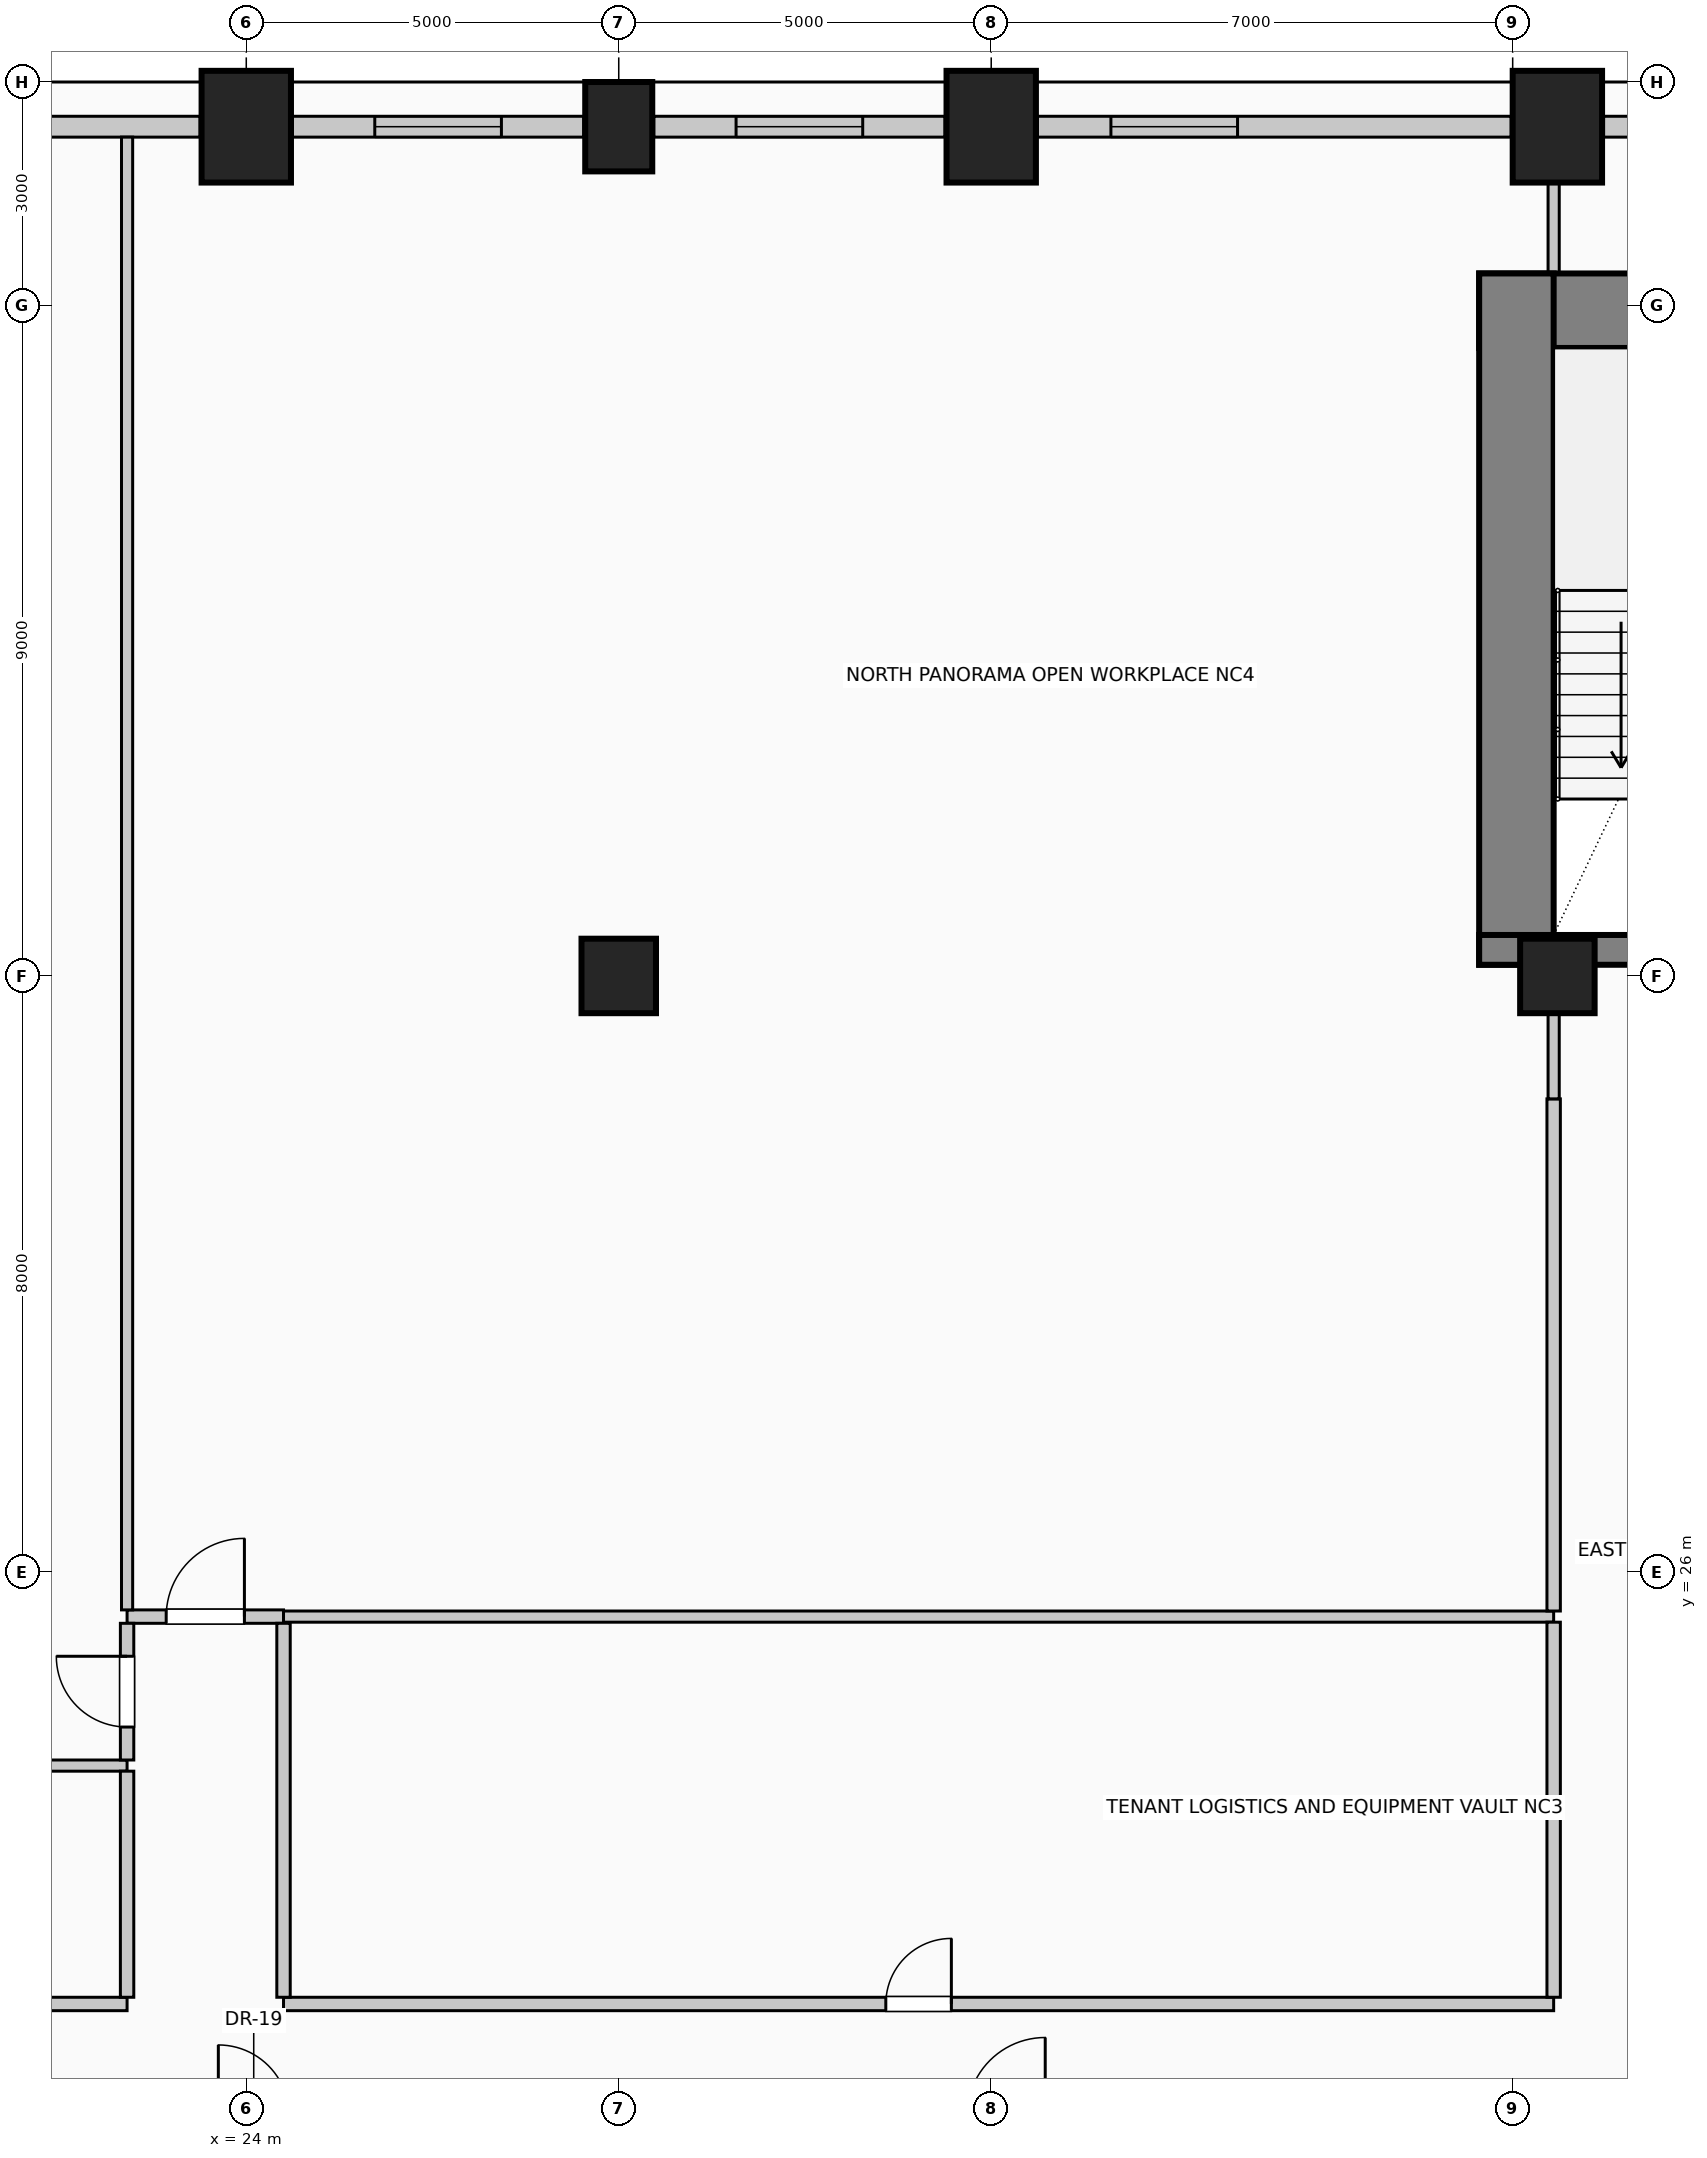
"""IFC4 building model, lengths in metres.
Left out: names, types, materials, properties, quantities, classifications, styles, units other than length and angle.
Written with IfcOpenShell. Run it as: python <this file> out.ifc"""

import sys

from ifc_helpers import new_model, si_unit, direction, frame, frame_2d, origin, origin_2d, place, context, subcontext, project, spatial, rectangle, circle, extrude, element, fill, save


model = new_model("IFC4")
c1 = context("Model", 3, precision=1e-05, world=origin(), true_north=direction((0.0, 1.0)))
c2 = subcontext(c1, "Body", "Model", "MODEL_VIEW")
j1 = project(units=[si_unit("LENGTHUNIT", "METRE"), si_unit("PLANEANGLEUNIT", "RADIAN")], contexts=[c1])
p1 = place(None, origin())
s1 = spatial("IfcSite", under=j1, at=p1, CompositionType="ELEMENT")
p2 = place(p1, origin())
s2 = spatial("IfcBuilding", under=s1, at=p2, CompositionType="ELEMENT")
p3 = place(p2, frame((0.0, 0.0, 78.6)))
s3 = spatial("IfcBuildingStorey", under=s2, at=p3, CompositionType="ELEMENT", Elevation=78.6)
p4 = place(p3, frame((40.55, 42.93, 0.0), z_axis=(0.0, 0.0, 1.0), x_axis=(1.0, 0.0, 0.0)))
e1 = element("IfcWall", 1, at=p4, inside=s3, PredefinedType="SHEAR", context=c2, shape_type="SweptSolid", body=[
    extrude(rectangle(XDim=14.9, YDim=1.0, at=frame_2d((7.45, 0.0))), origin(), (0.0, 0.0, 1.0), 4.0),
])
p5 = place(p3, frame((41.05, 34.15, 0.0), z_axis=(0.0, 0.0, 1.0), x_axis=(0.0, 1.0, 0.0)))
e2 = element("IfcWall", 2, at=p5, inside=s3, PredefinedType="SHEAR", context=c2, shape_type="SweptSolid", body=[
    extrude(rectangle(XDim=9.28, YDim=1.0, at=frame_2d((4.64, 0.0))), origin(), (0.0, 0.0, 1.0), 4.0),
])
p6 = place(p3, frame((40.55, 34.35, 0.0), z_axis=(0.0, 0.0, 1.0), x_axis=(1.0, 0.0, 0.0)))
e3 = element("IfcWall", 3, at=p6, inside=s3, PredefinedType="SHEAR", context=c2, shape_type="SweptSolid", body=[
    extrude(rectangle(XDim=5.16, YDim=0.4, at=frame_2d((2.58, 0.0))), origin(), (0.0, 0.0, 1.0), 4.0),
])
p7 = place(p6, frame((2.4, 0.0, 0.0)))
e4 = element("IfcOpeningElement", 4, at=p7, cuts=e3, PredefinedType="OPENING", context=c2, shape_type="SweptSolid", body=[
    extrude(rectangle(XDim=1.15, YDim=2.2, at=frame_2d((0.575, 1.1))), frame((0.0, 0.21, 0.0), z_axis=(0.0, -1.0, 0.0), x_axis=(1.0, 0.0, 0.0)), (0.0, 0.0, 1.0), 0.42),
])
p8 = place(p3, frame((24.0, 45.4, 0.0), z_axis=(0.0, 0.0, 1.0), x_axis=(1.0, 0.0, 0.0)))
e5 = element("IfcColumn", 5, at=p8, inside=s3, PredefinedType="COLUMN", context=c2, shape_type="SweptSolid", body=[
    extrude(rectangle(XDim=1.2, YDim=1.5, at=origin_2d()), origin(), (0.0, 0.0, 1.0), 4.0),
])
p9 = place(p3, frame((29.0, 45.4, 0.0), z_axis=(0.0, 0.0, 1.0), x_axis=(1.0, 0.0, 0.0)))
e6 = element("IfcColumn", 6, at=p9, inside=s3, PredefinedType="COLUMN", context=c2, shape_type="SweptSolid", body=[
    extrude(rectangle(XDim=0.9, YDim=1.2, at=origin_2d()), origin(), (0.0, 0.0, 1.0), 4.0),
])
for number, where, z_axis, x_axis in (
    (7, (34.0, 45.4, 0.0), (0.0, 0.0, 1.0), (1.0, 0.0, 0.0)),
    (8, (41.6, 45.4, 0.0), (0.0, 0.0, 1.0), (1.0, 0.0, 0.0)),
):
    element("IfcColumn", number, at=place(p3, frame(where, z_axis=z_axis, x_axis=x_axis)), inside=s3, PredefinedType="COLUMN", context=c2, shape_type="SweptSolid", body=[
        extrude(rectangle(XDim=1.2, YDim=1.5, at=origin_2d()), origin(), (0.0, 0.0, 1.0), 4.0),
    ])
for number, where, z_axis, x_axis in (
    (9, (29.0, 34.0, 0.0), (0.0, 0.0, 1.0), (1.0, 0.0, 0.0)),
    (10, (41.6, 34.0, 0.0), (0.0, 0.0, 1.0), (1.0, 0.0, 0.0)),
):
    element("IfcColumn", number, at=place(p3, frame(where, z_axis=z_axis, x_axis=x_axis)), inside=s3, PredefinedType="COLUMN", context=c2, shape_type="SweptSolid", body=[
        extrude(circle(Radius=0.5, at=origin_2d()), origin(), (0.0, 0.0, 1.0), 4.0),
    ])
p10 = place(p3, frame((17.02, 45.4, 0.0), z_axis=(0.0, 0.0, 1.0), x_axis=(1.0, 0.0, 0.0)))
e11 = element("IfcWall", 11, at=p10, inside=s3, PredefinedType="SOLIDWALL", context=c2, shape_type="SweptSolid", body=[
    extrude(rectangle(XDim=6.36, YDim=0.28, at=frame_2d((3.18, 0.0))), origin(), (0.0, 0.0, 1.0), 2.81),
])
p11 = place(p3, frame((24.62, 45.4, 0.0), z_axis=(0.0, 0.0, 1.0), x_axis=(1.0, 0.0, 0.0)))
e12 = element("IfcWall", 12, at=p11, inside=s3, PredefinedType="SOLIDWALL", context=c2, shape_type="SweptSolid", body=[
    extrude(rectangle(XDim=3.91, YDim=0.28, at=frame_2d((1.955, 0.0))), origin(), (0.0, 0.0, 1.0), 2.81),
])
p12 = place(p11, frame((1.105, 0.0, 0.5)))
e13 = element("IfcOpeningElement", 13, at=p12, cuts=e12, PredefinedType="OPENING", context=c2, shape_type="SweptSolid", body=[
    extrude(rectangle(XDim=1.7, YDim=1.95, at=frame_2d((0.85, 0.975))), frame((0.0, 0.15, 0.0), z_axis=(0.0, -1.0, 0.0), x_axis=(1.0, 0.0, 0.0)), (0.0, 0.0, 1.0), 0.3),
])
p13 = place(p3, frame((29.47, 45.4, 0.0), z_axis=(0.0, 0.0, 1.0), x_axis=(1.0, 0.0, 0.0)))
e14 = element("IfcWall", 14, at=p13, inside=s3, PredefinedType="SOLIDWALL", context=c2, shape_type="SweptSolid", body=[
    extrude(rectangle(XDim=3.91, YDim=0.28, at=frame_2d((1.955, 0.0))), origin(), (0.0, 0.0, 1.0), 2.81),
])
p14 = place(p13, frame((1.105, 0.0, 0.5)))
e15 = element("IfcOpeningElement", 15, at=p14, cuts=e14, PredefinedType="OPENING", context=c2, shape_type="SweptSolid", body=[
    extrude(rectangle(XDim=1.7, YDim=1.95, at=frame_2d((0.85, 0.975))), frame((0.0, 0.15, 0.0), z_axis=(0.0, -1.0, 0.0), x_axis=(1.0, 0.0, 0.0)), (0.0, 0.0, 1.0), 0.3),
])
p15 = place(p3, frame((34.62, 45.4, 0.0), z_axis=(0.0, 0.0, 1.0), x_axis=(1.0, 0.0, 0.0)))
e16 = element("IfcWall", 16, at=p15, inside=s3, PredefinedType="SOLIDWALL", context=c2, shape_type="SweptSolid", body=[
    extrude(rectangle(XDim=6.36, YDim=0.28, at=frame_2d((3.18, 0.0))), origin(), (0.0, 0.0, 1.0), 2.81),
])
p16 = place(p15, frame((0.987, 0.0, 0.5)))
e17 = element("IfcOpeningElement", 17, at=p16, cuts=e16, PredefinedType="OPENING", context=c2, shape_type="SweptSolid", body=[
    extrude(rectangle(XDim=1.7, YDim=1.95, at=frame_2d((0.85, 0.975))), frame((0.0, 0.15, 0.0), z_axis=(0.0, -1.0, 0.0), x_axis=(1.0, 0.0, 0.0)), (0.0, 0.0, 1.0), 0.3),
])
p17 = place(p3, frame((42.22, 45.4, 0.0), z_axis=(0.0, 0.0, 1.0), x_axis=(1.0, 0.0, 0.0)))
e18 = element("IfcWall", 18, at=p17, inside=s3, PredefinedType="SOLIDWALL", context=c2, shape_type="SweptSolid", body=[
    extrude(rectangle(XDim=1.31, YDim=0.28, at=frame_2d((0.655, 0.0))), origin(), (0.0, 0.0, 1.0), 2.81),
])
p18 = place(p3, frame((16.65, 20.2, 0.0), z_axis=(0.0, 0.0, 1.0), x_axis=(1.0, 0.0, 0.0)))
e19 = element("IfcWall", 19, at=p18, inside=s3, PredefinedType="PARTITIONING", context=c2, shape_type="SweptSolid", body=[
    extrude(rectangle(XDim=5.75, YDim=0.18, at=frame_2d((2.875, 0.0))), origin(), (0.0, 0.0, 1.0), 3.66),
])
p19 = place(p18, frame((2.35, 0.0, 0.0)))
e20 = element("IfcOpeningElement", 20, at=p19, cuts=e19, PredefinedType="OPENING", context=c2, shape_type="SweptSolid", body=[
    extrude(rectangle(XDim=1.05, YDim=2.15, at=frame_2d((0.525, 1.075))), frame((0.0, 0.1, 0.0), z_axis=(0.0, -1.0, 0.0), x_axis=(1.0, 0.0, 0.0)), (0.0, 0.0, 1.0), 0.2),
])
p20 = place(p3, frame((24.5, 20.2, 0.0), z_axis=(0.0, 0.0, 1.0), x_axis=(1.0, 0.0, 0.0)))
e21 = element("IfcWall", 21, at=p20, inside=s3, PredefinedType="PARTITIONING", context=c2, shape_type="SweptSolid", body=[
    extrude(rectangle(XDim=17.05, YDim=0.18, at=frame_2d((8.525, 0.0))), origin(), (0.0, 0.0, 1.0), 3.66),
])
p21 = place(p20, frame((8.085, 0.0, 0.0)))
e22 = element("IfcOpeningElement", 22, at=p21, cuts=e21, PredefinedType="OPENING", context=c2, shape_type="SweptSolid", body=[
    extrude(rectangle(XDim=0.88, YDim=2.1, at=frame_2d((0.44, 1.05))), frame((0.0, 0.1, 0.0), z_axis=(0.0, -1.0, 0.0), x_axis=(1.0, 0.0, 0.0)), (0.0, 0.0, 1.0), 0.2),
])
p22 = place(p3, frame((16.65, 23.4, 0.0), z_axis=(0.0, 0.0, 1.0), x_axis=(1.0, 0.0, 0.0)))
e23 = element("IfcWall", 23, at=p22, inside=s3, PredefinedType="PARTITIONING", context=c2, shape_type="SweptSolid", body=[
    extrude(rectangle(XDim=5.75, YDim=0.15, at=frame_2d((2.875, 0.0))), origin(), (0.0, 0.0, 1.0), 3.66),
])
p23 = place(p3, frame((22.4, 25.4, 0.0), z_axis=(0.0, 0.0, 1.0), x_axis=(1.0, 0.0, 0.0)))
e24 = element("IfcWall", 24, at=p23, inside=s3, PredefinedType="PARTITIONING", context=c2, shape_type="SweptSolid", body=[
    extrude(rectangle(XDim=2.1, YDim=0.18, at=frame_2d((1.05, 0.0))), origin(), (0.0, 0.0, 1.0), 3.055),
])
p24 = place(p23, frame((0.525, 0.0, 0.0)))
e25 = element("IfcOpeningElement", 25, at=p24, cuts=e24, PredefinedType="OPENING", context=c2, shape_type="SweptSolid", body=[
    extrude(rectangle(XDim=1.05, YDim=2.15, at=frame_2d((0.525, 1.075))), frame((0.0, 0.1, 0.0), z_axis=(0.0, -1.0, 0.0), x_axis=(1.0, 0.0, 0.0)), (0.0, 0.0, 1.0), 0.2),
])
p25 = place(p3, frame((24.5, 25.4, 0.0), z_axis=(0.0, 0.0, 1.0), x_axis=(1.0, 0.0, 0.0)))
e26 = element("IfcWall", 26, at=p25, inside=s3, PredefinedType="PARTITIONING", context=c2, shape_type="SweptSolid", body=[
    extrude(rectangle(XDim=17.05, YDim=0.15, at=frame_2d((8.525, 0.0))), origin(), (0.0, 0.0, 1.0), 3.055),
])
p26 = place(p3, frame((22.4, 20.29, 0.0), z_axis=(0.0, 0.0, 1.0), x_axis=(0.0, 1.0, 0.0)))
e27 = element("IfcWall", 27, at=p26, inside=s3, PredefinedType="PARTITIONING", context=c2, shape_type="SweptSolid", body=[
    extrude(rectangle(XDim=3.035, YDim=0.18, at=frame_2d((1.518, 0.0))), origin(), (0.0, 0.0, 1.0), 3.66),
])
p27 = place(p3, frame((22.4, 23.475, 0.0), z_axis=(0.0, 0.0, 1.0), x_axis=(0.0, 1.0, 0.0)))
e28 = element("IfcWall", 28, at=p27, inside=s3, PredefinedType="PARTITIONING", context=c2, shape_type="SweptSolid", body=[
    extrude(rectangle(XDim=1.835, YDim=0.18, at=frame_2d((0.917, 0.0))), origin(), (0.0, 0.0, 1.0), 3.66),
])
p28 = place(p27, frame((0.442, 0.0, 0.0)))
e29 = element("IfcOpeningElement", 29, at=p28, cuts=e28, PredefinedType="OPENING", context=c2, shape_type="SweptSolid", body=[
    extrude(rectangle(XDim=0.95, YDim=2.15, at=frame_2d((0.475, 1.075))), frame((0.0, 0.1, 0.0), z_axis=(0.0, -1.0, 0.0), x_axis=(1.0, 0.0, 0.0)), (0.0, 0.0, 1.0), 0.2),
])
p29 = place(p3, frame((22.4, 25.49, 0.0), z_axis=(0.0, 0.0, 1.0), x_axis=(0.0, 1.0, 0.0)))
e30 = element("IfcWall", 30, at=p29, inside=s3, PredefinedType="PARTITIONING", context=c2, shape_type="SweptSolid", body=[
    extrude(rectangle(XDim=19.77, YDim=0.15, at=frame_2d((9.885, 0.0))), origin(), (0.0, 0.0, 1.0), 3.66),
])
p30 = place(p3, frame((24.5, 20.29, 0.0), z_axis=(0.0, 0.0, 1.0), x_axis=(0.0, 1.0, 0.0)))
e31 = element("IfcWall", 31, at=p30, inside=s3, PredefinedType="PARTITIONING", context=c2, shape_type="SweptSolid", body=[
    extrude(rectangle(XDim=5.02, YDim=0.18, at=frame_2d((2.51, 0.0))), origin(), (0.0, 0.0, 1.0), 3.66),
])
p31 = place(p3, frame((41.55, 20.29, 0.0), z_axis=(0.0, 0.0, 1.0), x_axis=(0.0, 1.0, 0.0)))
e32 = element("IfcWall", 32, at=p31, inside=s3, PredefinedType="PARTITIONING", context=c2, shape_type="SweptSolid", body=[
    extrude(rectangle(XDim=5.035, YDim=0.18, at=frame_2d((2.518, 0.0))), origin(), (0.0, 0.0, 1.0), 2.955),
])
p32 = place(p3, frame((41.55, 25.475, 0.0), z_axis=(0.0, 0.0, 1.0), x_axis=(0.0, 1.0, 0.0)))
e33 = element("IfcWall", 33, at=p32, inside=s3, PredefinedType="PARTITIONING", context=c2, shape_type="SweptSolid", body=[
    extrude(rectangle(XDim=6.875, YDim=0.18, at=frame_2d((3.438, 0.0))), origin(), (0.0, 0.0, 1.0), 2.955),
])
p33 = place(p3, frame((41.55, 32.35, 0.0), z_axis=(0.0, 0.0, 1.0), x_axis=(0.0, 1.0, 0.0)))
e34 = element("IfcWall", 34, at=p33, inside=s3, PredefinedType="PARTITIONING", context=c2, shape_type="SweptSolid", body=[
    extrude(rectangle(XDim=1.15, YDim=0.15, at=frame_2d((0.575, 0.0))), origin(), (0.0, 0.0, 1.0), 2.955),
])
p34 = place(p3, frame((41.55, 43.43, 0.0), z_axis=(0.0, 0.0, 1.0), x_axis=(0.0, 1.0, 0.0)))
e35 = element("IfcWall", 35, at=p34, inside=s3, PredefinedType="PARTITIONING", context=c2, shape_type="SweptSolid", body=[
    extrude(rectangle(XDim=1.22, YDim=0.15, at=frame_2d((0.61, 0.0))), origin(), (0.0, 0.0, 1.0), 3.66),
])
p35 = place(p12, origin())
e36 = element("IfcWindow", 36, at=p35, inside=s3, PartitioningType="SINGLE_PANEL", PredefinedType="WINDOW", context=c2, shape_type="SweptSolid", body=[
    extrude(rectangle(XDim=1.7, YDim=1.95, at=frame_2d((0.85, 0.975))), frame((0.0, 0.03, 0.0), z_axis=(0.0, -1.0, 0.0), x_axis=(1.0, 0.0, 0.0)), (0.0, 0.0, 1.0), 0.06),
])
fill(e13, e36)
p36 = place(p14, origin())
e37 = element("IfcWindow", 37, at=p36, inside=s3, PartitioningType="SINGLE_PANEL", PredefinedType="WINDOW", context=c2, shape_type="SweptSolid", body=[
    extrude(rectangle(XDim=1.7, YDim=1.95, at=frame_2d((0.85, 0.975))), frame((0.0, 0.03, 0.0), z_axis=(0.0, -1.0, 0.0), x_axis=(1.0, 0.0, 0.0)), (0.0, 0.0, 1.0), 0.06),
])
fill(e15, e37)
p37 = place(p16, origin())
e38 = element("IfcWindow", 38, at=p37, inside=s3, PartitioningType="SINGLE_PANEL", PredefinedType="WINDOW", context=c2, shape_type="SweptSolid", body=[
    extrude(rectangle(XDim=1.7, YDim=1.95, at=frame_2d((0.85, 0.975))), frame((0.0, 0.03, 0.0), z_axis=(0.0, -1.0, 0.0), x_axis=(1.0, 0.0, 0.0)), (0.0, 0.0, 1.0), 0.06),
])
fill(e17, e38)
p38 = place(p21, origin())
e39 = element("IfcDoor", 39, at=p38, inside=s3, OperationType="SINGLE_SWING_RIGHT", PredefinedType="DOOR", context=c2, shape_type="SweptSolid", body=[
    extrude(rectangle(XDim=0.88, YDim=2.1, at=frame_2d((0.44, 1.05))), frame((0.0, 0.025, 0.0), z_axis=(0.0, -1.0, 0.0), x_axis=(1.0, 0.0, 0.0)), (0.0, 0.0, 1.0), 0.05),
])
fill(e22, e39)
p39 = place(p24, origin())
e40 = element("IfcDoor", 40, at=p39, inside=s3, OperationType="SINGLE_SWING_RIGHT", PredefinedType="DOOR", context=c2, shape_type="SweptSolid", body=[
    extrude(rectangle(XDim=1.05, YDim=2.15, at=frame_2d((0.525, 1.075))), frame((0.0, 0.025, 0.0), z_axis=(0.0, -1.0, 0.0), x_axis=(1.0, 0.0, 0.0)), (0.0, 0.0, 1.0), 0.05),
])
fill(e25, e40)
p40 = place(p28, origin())
e41 = element("IfcDoor", 41, at=p40, inside=s3, OperationType="SINGLE_SWING_RIGHT", PredefinedType="DOOR", context=c2, shape_type="SweptSolid", body=[
    extrude(rectangle(XDim=0.95, YDim=2.15, at=frame_2d((0.475, 1.075))), frame((0.0, 0.025, 0.0), z_axis=(0.0, -1.0, 0.0), x_axis=(1.0, 0.0, 0.0)), (0.0, 0.0, 1.0), 0.05),
])
fill(e29, e41)
save(model, sys.argv[1])
